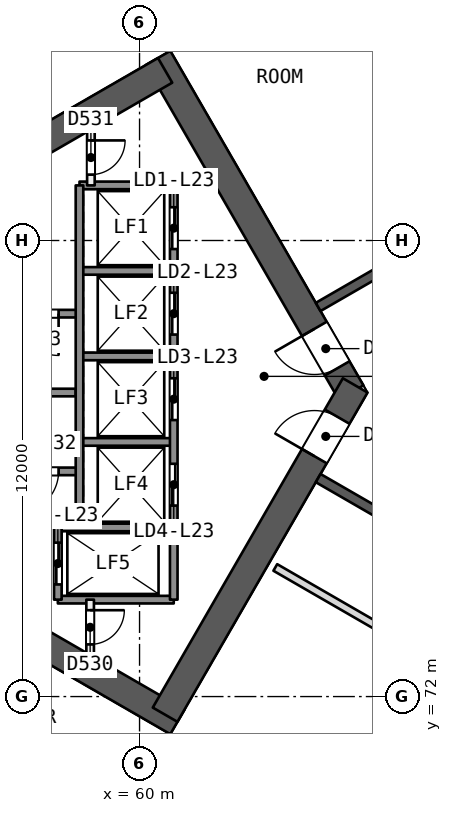
"""IFC4 building model, lengths in metres.
Left out: names, types, materials, properties, quantities, classifications, styles, units other than length and angle.
Written with IfcOpenShell. Run it as: python <this file> out.ifc"""

import sys

from ifc_helpers import new_model, si_unit, direction, frame, frame_2d, origin, place, context, subcontext, project, spatial, rectangle, extrude, element, fill, save


model = new_model("IFC4")
c1 = context("Model", 3, precision=1e-05, world=origin(), true_north=direction((0.0, 1.0)))
c2 = subcontext(c1, "Body", "Model", "MODEL_VIEW")
j1 = project(units=[si_unit("LENGTHUNIT", "METRE"), si_unit("PLANEANGLEUNIT", "RADIAN")], contexts=[c1])
p1 = place(None, origin())
s1 = spatial("IfcSite", under=j1, at=p1, CompositionType="ELEMENT")
p2 = place(p1, origin())
s2 = spatial("IfcBuilding", under=s1, at=p2, CompositionType="ELEMENT")
p3 = place(p2, frame((0.0, 0.0, 98.0)))
s3 = spatial("IfcBuildingStorey", under=s2, at=p3, CompositionType="ELEMENT", Elevation=98.0)
p4 = place(p3, frame((65.567, 80.0, 0.0), z_axis=(0.0, 0.0, 1.0), x_axis=(-0.499988615364, 0.866031976607, 0.0)))
e1 = element("IfcWall", 1, at=p4, inside=s3, PredefinedType="SHEAR", context=c2, shape_type="SweptSolid", body=[
    extrude(rectangle(XDim=10.163, YDim=0.75, at=frame_2d((5.082, 0.0))), origin(), (0.0, 0.0, 1.0), 4.4),
])
p5 = place(p4, frame((0.733, 0.0, 0.0)))
e2 = element("IfcOpeningElement", 2, at=p5, cuts=e1, PredefinedType="OPENING", context=c2, shape_type="SweptSolid", body=[
    extrude(rectangle(XDim=1.2, YDim=2.1, at=frame_2d((0.6, 1.05))), frame((0.0, 0.385, 0.0), z_axis=(0.0, -1.0, 0.0), x_axis=(1.0, 0.0, 0.0)), (0.0, 0.0, 1.0), 0.771),
])
p6 = place(p3, frame((60.673, 88.477, 0.0), z_axis=(0.0, 0.0, 1.0), x_axis=(-0.8660248072, -0.500001033313, 0.0)))
e3 = element("IfcWall", 3, at=p6, inside=s3, PredefinedType="SHEAR", context=c2, shape_type="SweptSolid", body=[
    extrude(rectangle(XDim=13.958, YDim=0.75, at=frame_2d((6.979, 0.0))), origin(), (0.0, 0.0, 1.0), 4.4),
])
p7 = place(p3, frame((48.772, 78.394, 0.0), z_axis=(0.0, 0.0, 1.0), x_axis=(0.866028339916, -0.499994914436, 0.0)))
e4 = element("IfcWall", 4, at=p7, inside=s3, PredefinedType="SHEAR", context=c2, shape_type="SweptSolid", body=[
    extrude(rectangle(XDim=14.117, YDim=0.75, at=frame_2d((7.059, 0.0))), origin(), (0.0, 0.0, 1.0), 4.4),
])
p8 = place(p3, frame((60.673, 71.523, 0.0), z_axis=(0.0, 0.0, 1.0), x_axis=(0.499997052475, 0.866027105532, 0.0)))
e5 = element("IfcWall", 5, at=p8, inside=s3, PredefinedType="SHEAR", context=c2, shape_type="SweptSolid", body=[
    extrude(rectangle(XDim=10.005, YDim=0.75, at=frame_2d((5.002, 0.0))), origin(), (0.0, 0.0, 1.0), 4.4),
])
p9 = place(p8, frame((7.855, 0.0, 0.0)))
e6 = element("IfcOpeningElement", 6, at=p9, cuts=e5, PredefinedType="OPENING", context=c2, shape_type="SweptSolid", body=[
    extrude(rectangle(XDim=1.2, YDim=2.1, at=frame_2d((0.6, 1.05))), frame((0.0, 0.385, 0.0), z_axis=(0.0, -1.0, 0.0), x_axis=(1.0, 0.0, 0.0)), (0.0, 0.0, 1.0), 0.771),
])
p10 = place(p3, frame((78.2, 90.046, 0.0), z_axis=(0.0, 0.0, 1.0), x_axis=(-0.866026492143, -0.499998114903, 0.0)))
e7 = element("IfcWall", 7, at=p10, inside=s3, PredefinedType="SHEAR", context=c2, shape_type="SweptSolid", body=[
    extrude(rectangle(XDim=15.588, YDim=0.25, at=frame_2d((7.794, 0.0))), origin(), (0.0, 0.0, 1.0), 3.9),
])
p11 = place(p10, frame((2.05, 0.0, 0.0)))
e8 = element("IfcOpeningElement", 8, at=p11, cuts=e7, PredefinedType="OPENING", context=c2, shape_type="SweptSolid", body=[
    extrude(rectangle(XDim=1.2, YDim=2.4, at=frame_2d((0.6, 1.2))), frame((0.0, 0.135, 0.0), z_axis=(0.0, -1.0, 0.0), x_axis=(1.0, 0.0, 0.0)), (0.0, 0.0, 1.0), 0.271),
])
p12 = place(p10, frame((7.272, 0.0, 0.0)))
e9 = element("IfcOpeningElement", 9, at=p12, cuts=e7, PredefinedType="OPENING", context=c2, shape_type="SweptSolid", body=[
    extrude(rectangle(XDim=1.2, YDim=2.4, at=frame_2d((0.6, 1.2))), frame((0.0, 0.135, 0.0), z_axis=(0.0, -1.0, 0.0), x_axis=(1.0, 0.0, 0.0)), (0.0, 0.0, 1.0), 0.271),
])
p13 = place(p10, frame((12.417, 0.0, 0.0)))
e10 = element("IfcOpeningElement", 10, at=p13, cuts=e7, PredefinedType="OPENING", context=c2, shape_type="SweptSolid", body=[
    extrude(rectangle(XDim=1.2, YDim=2.4, at=frame_2d((0.6, 1.2))), frame((0.0, 0.135, 0.0), z_axis=(0.0, -1.0, 0.0), x_axis=(1.0, 0.0, 0.0)), (0.0, 0.0, 1.0), 0.271),
])
p14 = place(p3, frame((64.7, 77.748, 0.0), z_axis=(0.0, 0.0, 1.0), x_axis=(0.866026492143, -0.499998114903, 0.0)))
e11 = element("IfcWall", 11, at=p14, inside=s3, PredefinedType="SHEAR", context=c2, shape_type="SweptSolid", body=[
    extrude(rectangle(XDim=15.588, YDim=0.25, at=frame_2d((7.794, 0.0))), origin(), (0.0, 0.0, 1.0), 3.9),
])
p15 = place(p14, frame((3.297, 0.0, 0.0)))
e12 = element("IfcOpeningElement", 12, at=p15, cuts=e11, PredefinedType="OPENING", context=c2, shape_type="SweptSolid", body=[
    extrude(rectangle(XDim=1.2, YDim=2.4, at=frame_2d((0.6, 1.2))), frame((0.0, 0.135, 0.0), z_axis=(0.0, -1.0, 0.0), x_axis=(1.0, 0.0, 0.0)), (0.0, 0.0, 1.0), 0.271),
])
p16 = place(p14, frame((9.143, 0.0, 0.0)))
e13 = element("IfcOpeningElement", 13, at=p16, cuts=e11, PredefinedType="OPENING", context=c2, shape_type="SweptSolid", body=[
    extrude(rectangle(XDim=1.2, YDim=2.4, at=frame_2d((0.6, 1.2))), frame((0.0, 0.135, 0.0), z_axis=(0.0, -1.0, 0.0), x_axis=(1.0, 0.0, 0.0)), (0.0, 0.0, 1.0), 0.271),
])
p17 = place(p14, frame((13.04, 0.0, 0.0)))
e14 = element("IfcOpeningElement", 14, at=p17, cuts=e11, PredefinedType="OPENING", context=c2, shape_type="SweptSolid", body=[
    extrude(rectangle(XDim=1.2, YDim=2.4, at=frame_2d((0.6, 1.2))), frame((0.0, 0.135, 0.0), z_axis=(0.0, -1.0, 0.0), x_axis=(1.0, 0.0, 0.0)), (0.0, 0.0, 1.0), 0.271),
])
p18 = place(p3, frame((62.716, 95.977, 0.0), z_axis=(0.0, 0.0, 1.0), x_axis=(0.500006895855, -0.866021422424, 0.0)))
e15 = element("IfcWall", 15, at=p18, inside=s3, PredefinedType="PARTITIONING", context=c2, shape_type="SweptSolid", body=[
    extrude(rectangle(XDim=12.878, YDim=0.2, at=frame_2d((6.439, 0.0))), origin(), (0.0, 0.0, 1.0), 3.9),
])
p19 = place(p3, frame((63.572, 75.397, 0.0), z_axis=(0.0, 0.0, 1.0), x_axis=(0.866024999478, -0.500000700278, 0.0)))
e16 = element("IfcWall", 16, at=p19, inside=s3, PredefinedType="PARTITIONING", context=c2, shape_type="SweptSolid", body=[
    extrude(rectangle(XDim=7.595, YDim=0.2, at=frame_2d((3.798, 0.0))), origin(), (0.0, 0.0, 1.0), 3.9),
])
p20 = place(p19, frame((3.198, 0.0, 0.0)))
e17 = element("IfcOpeningElement", 17, at=p20, cuts=e16, PredefinedType="OPENING", context=c2, shape_type="SweptSolid", body=[
    extrude(rectangle(XDim=1.2, YDim=2.4, at=frame_2d((0.6, 1.2))), frame((0.0, 0.11, 0.0), z_axis=(0.0, -1.0, 0.0), x_axis=(1.0, 0.0, 0.0)), (0.0, 0.0, 1.0), 0.221),
])
p21 = place(p3, frame((65.011, 62.698, 0.0), z_axis=(0.0, 0.0, 1.0), x_axis=(0.499992677578, 0.866029631346, 0.0)))
e18 = element("IfcWall", 18, at=p21, inside=s3, PredefinedType="PARTITIONING", context=c2, shape_type="SweptSolid", body=[
    extrude(rectangle(XDim=12.878, YDim=0.2, at=frame_2d((6.439, 0.0))), origin(), (0.0, 0.0, 1.0), 3.9),
])
p22 = place(p3, frame((39.875, 82.961, 0.0), z_axis=(0.0, 0.0, 1.0), x_axis=(0.866025498246, 0.499999836387, 0.0)))
e19 = element("IfcWall", 19, at=p22, inside=s3, PredefinedType="SOLIDWALL", context=c2, shape_type="SweptSolid", body=[
    extrude(rectangle(XDim=57.878, YDim=0.3, at=frame_2d((28.939, 0.0))), origin(), (0.0, 0.0, 1.0), 3.9),
])
p23 = place(p22, frame((3.323, 0.0, 0.6)))
e20 = element("IfcOpeningElement", 20, at=p23, cuts=e19, PredefinedType="OPENING", context=c2, shape_type="SweptSolid", body=[
    extrude(rectangle(XDim=3.0, YDim=2.4, at=frame_2d((1.5, 1.2))), frame((0.0, 0.161, 0.0), z_axis=(0.0, -1.0, 0.0), x_axis=(1.0, 0.0, 0.0)), (0.0, 0.0, 1.0), 0.321),
])
p24 = place(p22, frame((12.969, 0.0, 0.6)))
e21 = element("IfcOpeningElement", 21, at=p24, cuts=e19, PredefinedType="OPENING", context=c2, shape_type="SweptSolid", body=[
    extrude(rectangle(XDim=3.0, YDim=2.4, at=frame_2d((1.5, 1.2))), frame((0.0, 0.161, 0.0), z_axis=(0.0, -1.0, 0.0), x_axis=(1.0, 0.0, 0.0)), (0.0, 0.0, 1.0), 0.321),
])
p25 = place(p22, frame((22.616, 0.0, 0.6)))
e22 = element("IfcOpeningElement", 22, at=p25, cuts=e19, PredefinedType="OPENING", context=c2, shape_type="SweptSolid", body=[
    extrude(rectangle(XDim=3.0, YDim=2.4, at=frame_2d((1.5, 1.2))), frame((0.0, 0.161, 0.0), z_axis=(0.0, -1.0, 0.0), x_axis=(1.0, 0.0, 0.0)), (0.0, 0.0, 1.0), 0.321),
])
p26 = place(p22, frame((32.262, 0.0, 0.6)))
e23 = element("IfcOpeningElement", 23, at=p26, cuts=e19, PredefinedType="OPENING", context=c2, shape_type="SweptSolid", body=[
    extrude(rectangle(XDim=3.0, YDim=2.4, at=frame_2d((1.5, 1.2))), frame((0.0, 0.161, 0.0), z_axis=(0.0, -1.0, 0.0), x_axis=(1.0, 0.0, 0.0)), (0.0, 0.0, 1.0), 0.321),
])
p27 = place(p22, frame((41.908, 0.0, 0.6)))
e24 = element("IfcOpeningElement", 24, at=p27, cuts=e19, PredefinedType="OPENING", context=c2, shape_type="SweptSolid", body=[
    extrude(rectangle(XDim=3.0, YDim=2.4, at=frame_2d((1.5, 1.2))), frame((0.0, 0.161, 0.0), z_axis=(0.0, -1.0, 0.0), x_axis=(1.0, 0.0, 0.0)), (0.0, 0.0, 1.0), 0.321),
])
p28 = place(p22, frame((51.555, 0.0, 0.6)))
e25 = element("IfcOpeningElement", 25, at=p28, cuts=e19, PredefinedType="OPENING", context=c2, shape_type="SweptSolid", body=[
    extrude(rectangle(XDim=3.0, YDim=2.4, at=frame_2d((1.5, 1.2))), frame((0.0, 0.161, 0.0), z_axis=(0.0, -1.0, 0.0), x_axis=(1.0, 0.0, 0.0)), (0.0, 0.0, 1.0), 0.321),
])
p29 = place(p3, frame((89.998, 48.1, 0.0), z_axis=(0.0, 0.0, 1.0), x_axis=(-0.866025498246, 0.499999836387, 0.0)))
e26 = element("IfcWall", 26, at=p29, inside=s3, PredefinedType="SOLIDWALL", context=c2, shape_type="SweptSolid", body=[
    extrude(rectangle(XDim=57.878, YDim=0.3, at=frame_2d((28.939, 0.0))), origin(), (0.0, 0.0, 1.0), 3.9),
])
p30 = place(p29, frame((3.323, 0.0, 0.6)))
e27 = element("IfcOpeningElement", 27, at=p30, cuts=e26, PredefinedType="OPENING", context=c2, shape_type="SweptSolid", body=[
    extrude(rectangle(XDim=3.0, YDim=2.4, at=frame_2d((1.5, 1.2))), frame((0.0, 0.161, 0.0), z_axis=(0.0, -1.0, 0.0), x_axis=(1.0, 0.0, 0.0)), (0.0, 0.0, 1.0), 0.321),
])
p31 = place(p29, frame((12.969, 0.0, 0.6)))
e28 = element("IfcOpeningElement", 28, at=p31, cuts=e26, PredefinedType="OPENING", context=c2, shape_type="SweptSolid", body=[
    extrude(rectangle(XDim=3.0, YDim=2.4, at=frame_2d((1.5, 1.2))), frame((0.0, 0.161, 0.0), z_axis=(0.0, -1.0, 0.0), x_axis=(1.0, 0.0, 0.0)), (0.0, 0.0, 1.0), 0.321),
])
p32 = place(p29, frame((22.616, 0.0, 0.6)))
e29 = element("IfcOpeningElement", 29, at=p32, cuts=e26, PredefinedType="OPENING", context=c2, shape_type="SweptSolid", body=[
    extrude(rectangle(XDim=3.0, YDim=2.4, at=frame_2d((1.5, 1.2))), frame((0.0, 0.161, 0.0), z_axis=(0.0, -1.0, 0.0), x_axis=(1.0, 0.0, 0.0)), (0.0, 0.0, 1.0), 0.321),
])
p33 = place(p29, frame((32.262, 0.0, 0.6)))
e30 = element("IfcOpeningElement", 30, at=p33, cuts=e26, PredefinedType="OPENING", context=c2, shape_type="SweptSolid", body=[
    extrude(rectangle(XDim=3.0, YDim=2.4, at=frame_2d((1.5, 1.2))), frame((0.0, 0.161, 0.0), z_axis=(0.0, -1.0, 0.0), x_axis=(1.0, 0.0, 0.0)), (0.0, 0.0, 1.0), 0.321),
])
p34 = place(p29, frame((41.908, 0.0, 0.6)))
e31 = element("IfcOpeningElement", 31, at=p34, cuts=e26, PredefinedType="OPENING", context=c2, shape_type="SweptSolid", body=[
    extrude(rectangle(XDim=3.0, YDim=2.4, at=frame_2d((1.5, 1.2))), frame((0.0, 0.161, 0.0), z_axis=(0.0, -1.0, 0.0), x_axis=(1.0, 0.0, 0.0)), (0.0, 0.0, 1.0), 0.321),
])
p35 = place(p29, frame((51.555, 0.0, 0.6)))
e32 = element("IfcOpeningElement", 32, at=p35, cuts=e26, PredefinedType="OPENING", context=c2, shape_type="SweptSolid", body=[
    extrude(rectangle(XDim=3.0, YDim=2.4, at=frame_2d((1.5, 1.2))), frame((0.0, 0.161, 0.0), z_axis=(0.0, -1.0, 0.0), x_axis=(1.0, 0.0, 0.0)), (0.0, 0.0, 1.0), 0.321),
])
for number, where, z_axis, x_axis in (
    (33, (60.9, 85.45, 0.0), (0.0, 0.0, 1.0), (-1.0, 0.0, 0.0)),
    (34, (60.9, 83.2, 0.0), (0.0, 0.0, 1.0), (-1.0, 0.0, 0.0)),
):
    element("IfcWall", number, at=place(p3, frame(where, z_axis=z_axis, x_axis=x_axis)), inside=s3, PredefinedType="SOLIDWALL", context=c2, shape_type="SweptSolid", body=[
        extrude(rectangle(XDim=2.48, YDim=0.2, at=frame_2d((1.24, 0.0))), origin(), (0.0, 0.0, 1.0), 3.9),
    ])
p36 = place(p3, frame((58.42, 82.075, 0.0), z_axis=(0.0, 0.0, 1.0), x_axis=(-1.0, 0.0, 0.0)))
e35 = element("IfcWall", 35, at=p36, inside=s3, PredefinedType="SOLIDWALL", context=c2, shape_type="SweptSolid", body=[
    extrude(rectangle(XDim=7.7, YDim=0.2, at=frame_2d((3.85, 0.0))), origin(), (0.0, 0.0, 1.0), 3.9),
])
p37 = place(p36, frame((0.55, 0.0, 0.0)))
e36 = element("IfcOpeningElement", 36, at=p37, cuts=e35, PredefinedType="OPENING", context=c2, shape_type="SweptSolid", body=[
    extrude(rectangle(XDim=1.1, YDim=2.1, at=frame_2d((0.55, 1.05))), frame((0.0, 0.11, 0.0), z_axis=(0.0, -1.0, 0.0), x_axis=(1.0, 0.0, 0.0)), (0.0, 0.0, 1.0), 0.221),
])
p38 = place(p3, frame((60.9, 80.95, 0.0), z_axis=(0.0, 0.0, 1.0), x_axis=(-1.0, 0.0, 0.0)))
e37 = element("IfcWall", 37, at=p38, inside=s3, PredefinedType="SOLIDWALL", context=c2, shape_type="SweptSolid", body=[
    extrude(rectangle(XDim=2.48, YDim=0.2, at=frame_2d((1.24, 0.0))), origin(), (0.0, 0.0, 1.0), 3.9),
])
p39 = place(p3, frame((58.32, 80.0, 0.0), z_axis=(0.0, 0.0, 1.0), x_axis=(-1.0, 0.0, 0.0)))
e38 = element("IfcWall", 38, at=p39, inside=s3, PredefinedType="SOLIDWALL", context=c2, shape_type="SweptSolid", body=[
    extrude(rectangle(XDim=2.2, YDim=0.2, at=frame_2d((1.1, 0.0))), origin(), (0.0, 0.0, 1.0), 3.9),
])
p40 = place(p3, frame((60.9, 78.7, 0.0), z_axis=(0.0, 0.0, 1.0), x_axis=(-1.0, 0.0, 0.0)))
e39 = element("IfcWall", 39, at=p40, inside=s3, PredefinedType="SOLIDWALL", context=c2, shape_type="SweptSolid", body=[
    extrude(rectangle(XDim=2.48, YDim=0.2, at=frame_2d((1.24, 0.0))), origin(), (0.0, 0.0, 1.0), 3.9),
])
p41 = place(p3, frame((58.42, 77.925, 0.0), z_axis=(0.0, 0.0, 1.0), x_axis=(-1.0, 0.0, 0.0)))
e40 = element("IfcWall", 40, at=p41, inside=s3, PredefinedType="SOLIDWALL", context=c2, shape_type="SweptSolid", body=[
    extrude(rectangle(XDim=7.7, YDim=0.2, at=frame_2d((3.85, 0.0))), origin(), (0.0, 0.0, 1.0), 3.9),
])
p42 = place(p41, frame((0.55, 0.0, 0.0)))
e41 = element("IfcOpeningElement", 41, at=p42, cuts=e40, PredefinedType="OPENING", context=c2, shape_type="SweptSolid", body=[
    extrude(rectangle(XDim=1.1, YDim=2.1, at=frame_2d((0.55, 1.05))), frame((0.0, 0.11, 0.0), z_axis=(0.0, -1.0, 0.0), x_axis=(1.0, 0.0, 0.0)), (0.0, 0.0, 1.0), 0.221),
])
for number, where, z_axis, x_axis in (
    (42, (60.9, 76.45, 0.0), (0.0, 0.0, 1.0), (-1.0, 0.0, 0.0)),
    (43, (60.9, 74.55, 0.0), (0.0, 0.0, 1.0), (-1.0, 0.0, 0.0)),
):
    element("IfcWall", number, at=place(p3, frame(where, z_axis=z_axis, x_axis=x_axis)), inside=s3, PredefinedType="SOLIDWALL", context=c2, shape_type="SweptSolid", body=[
        extrude(rectangle(XDim=3.05, YDim=0.2, at=frame_2d((1.525, 0.0))), origin(), (0.0, 0.0, 1.0), 3.9),
    ])
p43 = place(p3, frame((60.9, 85.45, 0.0), z_axis=(0.0, 0.0, 1.0), x_axis=(0.0, -1.0, 0.0)))
e44 = element("IfcWall", 44, at=p43, inside=s3, PredefinedType="SOLIDWALL", context=c2, shape_type="SweptSolid", body=[
    extrude(rectangle(XDim=10.9, YDim=0.2, at=frame_2d((5.45, 0.0))), origin(), (0.0, 0.0, 1.0), 3.9),
])
p44 = place(p43, frame((0.575, 0.0, 0.0)))
e45 = element("IfcOpeningElement", 45, at=p44, cuts=e44, PredefinedType="OPENING", context=c2, shape_type="SweptSolid", body=[
    extrude(rectangle(XDim=1.1, YDim=2.1, at=frame_2d((0.55, 1.05))), frame((0.0, 0.11, 0.0), z_axis=(0.0, -1.0, 0.0), x_axis=(1.0, 0.0, 0.0)), (0.0, 0.0, 1.0), 0.221),
])
p45 = place(p43, frame((2.825, 0.0, 0.0)))
e46 = element("IfcOpeningElement", 46, at=p45, cuts=e44, PredefinedType="OPENING", context=c2, shape_type="SweptSolid", body=[
    extrude(rectangle(XDim=1.1, YDim=2.1, at=frame_2d((0.55, 1.05))), frame((0.0, 0.11, 0.0), z_axis=(0.0, -1.0, 0.0), x_axis=(1.0, 0.0, 0.0)), (0.0, 0.0, 1.0), 0.221),
])
p46 = place(p43, frame((5.075, 0.0, 0.0)))
e47 = element("IfcOpeningElement", 47, at=p46, cuts=e44, PredefinedType="OPENING", context=c2, shape_type="SweptSolid", body=[
    extrude(rectangle(XDim=1.1, YDim=2.1, at=frame_2d((0.55, 1.05))), frame((0.0, 0.11, 0.0), z_axis=(0.0, -1.0, 0.0), x_axis=(1.0, 0.0, 0.0)), (0.0, 0.0, 1.0), 0.221),
])
p47 = place(p43, frame((7.325, 0.0, 0.0)))
e48 = element("IfcOpeningElement", 48, at=p47, cuts=e44, PredefinedType="OPENING", context=c2, shape_type="SweptSolid", body=[
    extrude(rectangle(XDim=1.1, YDim=2.1, at=frame_2d((0.55, 1.05))), frame((0.0, 0.11, 0.0), z_axis=(0.0, -1.0, 0.0), x_axis=(1.0, 0.0, 0.0)), (0.0, 0.0, 1.0), 0.221),
])
p48 = place(p3, frame((58.72, 86.917, 0.0), z_axis=(0.0, 0.0, 1.0), x_axis=(0.0, -1.0, 0.0)))
e49 = element("IfcWall", 49, at=p48, inside=s3, PredefinedType="PARTITIONING", context=c2, shape_type="SweptSolid", body=[
    extrude(rectangle(XDim=1.467, YDim=0.2, at=frame_2d((0.733, 0.0))), origin(), (0.0, 0.0, 1.0), 3.9),
])
p49 = place(p48, frame((0.283, 0.0, 0.0)))
e50 = element("IfcOpeningElement", 50, at=p49, cuts=e49, PredefinedType="OPENING", context=c2, shape_type="SweptSolid", body=[
    extrude(rectangle(XDim=0.9, YDim=2.1, at=frame_2d((0.45, 1.05))), frame((0.0, 0.11, 0.0), z_axis=(0.0, -1.0, 0.0), x_axis=(1.0, 0.0, 0.0)), (0.0, 0.0, 1.0), 0.221),
])
p50 = place(p3, frame((58.7, 74.55, 0.0), z_axis=(0.0, 0.0, 1.0), x_axis=(0.0, -1.0, 0.0)))
e51 = element("IfcWall", 51, at=p50, inside=s3, PredefinedType="PARTITIONING", context=c2, shape_type="SweptSolid", body=[
    extrude(rectangle(XDim=1.455, YDim=0.2, at=frame_2d((0.728, 0.0))), origin(), (0.0, 0.0, 1.0), 3.9),
])
p51 = place(p50, frame((0.278, 0.0, 0.0)))
e52 = element("IfcOpeningElement", 52, at=p51, cuts=e51, PredefinedType="OPENING", context=c2, shape_type="SweptSolid", body=[
    extrude(rectangle(XDim=0.9, YDim=2.1, at=frame_2d((0.45, 1.05))), frame((0.0, 0.11, 0.0), z_axis=(0.0, -1.0, 0.0), x_axis=(1.0, 0.0, 0.0)), (0.0, 0.0, 1.0), 0.221),
])
p52 = place(p3, frame((58.42, 85.45, 0.0), z_axis=(0.0, 0.0, 1.0), x_axis=(0.0, -1.0, 0.0)))
e53 = element("IfcWall", 53, at=p52, inside=s3, PredefinedType="SOLIDWALL", context=c2, shape_type="SweptSolid", body=[
    extrude(rectangle(XDim=9.0, YDim=0.2, at=frame_2d((4.5, 0.0))), origin(), (0.0, 0.0, 1.0), 3.9),
])
p53 = place(p3, frame((57.85, 76.45, 0.0), z_axis=(0.0, 0.0, 1.0), x_axis=(0.0, -1.0, 0.0)))
e54 = element("IfcWall", 54, at=p53, inside=s3, PredefinedType="SOLIDWALL", context=c2, shape_type="SweptSolid", body=[
    extrude(rectangle(XDim=1.9, YDim=0.2, at=frame_2d((0.95, 0.0))), origin(), (0.0, 0.0, 1.0), 3.9),
])
p54 = place(p53, frame((0.4, 0.0, 0.0)))
e55 = element("IfcOpeningElement", 55, at=p54, cuts=e54, PredefinedType="OPENING", context=c2, shape_type="SweptSolid", body=[
    extrude(rectangle(XDim=1.1, YDim=2.1, at=frame_2d((0.55, 1.05))), frame((0.0, 0.11, 0.0), z_axis=(0.0, -1.0, 0.0), x_axis=(1.0, 0.0, 0.0)), (0.0, 0.0, 1.0), 0.221),
])
p55 = place(p5, origin())
e56 = element("IfcDoor", 56, at=p55, inside=s3, OperationType="SINGLE_SWING_RIGHT", PredefinedType="NOTDEFINED", context=c2, shape_type="SweptSolid", body=[
    extrude(rectangle(XDim=1.2, YDim=2.1, at=frame_2d((0.6, 1.05))), frame((0.0, 0.025, 0.0), z_axis=(0.0, -1.0, 0.0), x_axis=(1.0, 0.0, 0.0)), (0.0, 0.0, 1.0), 0.05),
])
fill(e2, e56)
p56 = place(p9, origin())
e57 = element("IfcDoor", 57, at=p56, inside=s3, OperationType="SINGLE_SWING_LEFT", PredefinedType="NOTDEFINED", context=c2, shape_type="SweptSolid", body=[
    extrude(rectangle(XDim=1.2, YDim=2.1, at=frame_2d((0.6, 1.05))), frame((0.0, 0.025, 0.0), z_axis=(0.0, -1.0, 0.0), x_axis=(1.0, 0.0, 0.0)), (0.0, 0.0, 1.0), 0.05),
])
fill(e6, e57)
p57 = place(p44, origin())
e58 = element("IfcDoor", 58, at=p57, inside=s3, OperationType="SLIDING_TO_RIGHT", PredefinedType="NOTDEFINED", context=c2, shape_type="SweptSolid", body=[
    extrude(rectangle(XDim=1.1, YDim=2.1, at=frame_2d((0.55, 1.05))), frame((0.0, 0.025, 0.0), z_axis=(0.0, -1.0, 0.0), x_axis=(1.0, 0.0, 0.0)), (0.0, 0.0, 1.0), 0.05),
])
fill(e45, e58)
p58 = place(p45, origin())
e59 = element("IfcDoor", 59, at=p58, inside=s3, OperationType="SLIDING_TO_LEFT", PredefinedType="NOTDEFINED", context=c2, shape_type="SweptSolid", body=[
    extrude(rectangle(XDim=1.1, YDim=2.1, at=frame_2d((0.55, 1.05))), frame((0.0, 0.025, 0.0), z_axis=(0.0, -1.0, 0.0), x_axis=(1.0, 0.0, 0.0)), (0.0, 0.0, 1.0), 0.05),
])
fill(e46, e59)
p59 = place(p46, origin())
e60 = element("IfcDoor", 60, at=p59, inside=s3, OperationType="SLIDING_TO_RIGHT", PredefinedType="NOTDEFINED", context=c2, shape_type="SweptSolid", body=[
    extrude(rectangle(XDim=1.1, YDim=2.1, at=frame_2d((0.55, 1.05))), frame((0.0, 0.025, 0.0), z_axis=(0.0, -1.0, 0.0), x_axis=(1.0, 0.0, 0.0)), (0.0, 0.0, 1.0), 0.05),
])
fill(e47, e60)
p60 = place(p47, origin())
e61 = element("IfcDoor", 61, at=p60, inside=s3, OperationType="SLIDING_TO_LEFT", PredefinedType="NOTDEFINED", context=c2, shape_type="SweptSolid", body=[
    extrude(rectangle(XDim=1.1, YDim=2.1, at=frame_2d((0.55, 1.05))), frame((0.0, 0.025, 0.0), z_axis=(0.0, -1.0, 0.0), x_axis=(1.0, 0.0, 0.0)), (0.0, 0.0, 1.0), 0.05),
])
fill(e48, e61)
p61 = place(p54, origin())
e62 = element("IfcDoor", 62, at=p61, inside=s3, OperationType="SLIDING_TO_RIGHT", PredefinedType="NOTDEFINED", context=c2, shape_type="SweptSolid", body=[
    extrude(rectangle(XDim=1.1, YDim=2.1, at=frame_2d((0.55, 1.05))), frame((0.0, 0.025, 0.0), z_axis=(0.0, -1.0, 0.0), x_axis=(1.0, 0.0, 0.0)), (0.0, 0.0, 1.0), 0.05),
])
fill(e55, e62)
p62 = place(p51, origin())
e63 = element("IfcDoor", 63, at=p62, inside=s3, OperationType="SINGLE_SWING_LEFT", PredefinedType="NOTDEFINED", context=c2, shape_type="SweptSolid", body=[
    extrude(rectangle(XDim=0.9, YDim=2.1, at=frame_2d((0.45, 1.05))), frame((0.0, 0.025, 0.0), z_axis=(0.0, -1.0, 0.0), x_axis=(1.0, 0.0, 0.0)), (0.0, 0.0, 1.0), 0.05),
])
fill(e52, e63)
p63 = place(p49, origin())
e64 = element("IfcDoor", 64, at=p63, inside=s3, OperationType="SINGLE_SWING_LEFT", PredefinedType="NOTDEFINED", context=c2, shape_type="SweptSolid", body=[
    extrude(rectangle(XDim=0.9, YDim=2.1, at=frame_2d((0.45, 1.05))), frame((0.0, 0.025, 0.0), z_axis=(0.0, -1.0, 0.0), x_axis=(1.0, 0.0, 0.0)), (0.0, 0.0, 1.0), 0.05),
])
fill(e50, e64)
p64 = place(p42, origin())
e65 = element("IfcDoor", 65, at=p64, inside=s3, OperationType="SINGLE_SWING_RIGHT", PredefinedType="NOTDEFINED", context=c2, shape_type="SweptSolid", body=[
    extrude(rectangle(XDim=1.1, YDim=2.1, at=frame_2d((0.55, 1.05))), frame((0.0, 0.025, 0.0), z_axis=(0.0, -1.0, 0.0), x_axis=(1.0, 0.0, 0.0)), (0.0, 0.0, 1.0), 0.05),
])
fill(e41, e65)
p65 = place(p37, origin())
e66 = element("IfcDoor", 66, at=p65, inside=s3, OperationType="SINGLE_SWING_LEFT", PredefinedType="NOTDEFINED", context=c2, shape_type="SweptSolid", body=[
    extrude(rectangle(XDim=1.1, YDim=2.1, at=frame_2d((0.55, 1.05))), frame((0.0, 0.025, 0.0), z_axis=(0.0, -1.0, 0.0), x_axis=(1.0, 0.0, 0.0)), (0.0, 0.0, 1.0), 0.05),
])
fill(e36, e66)
save(model, sys.argv[1])
